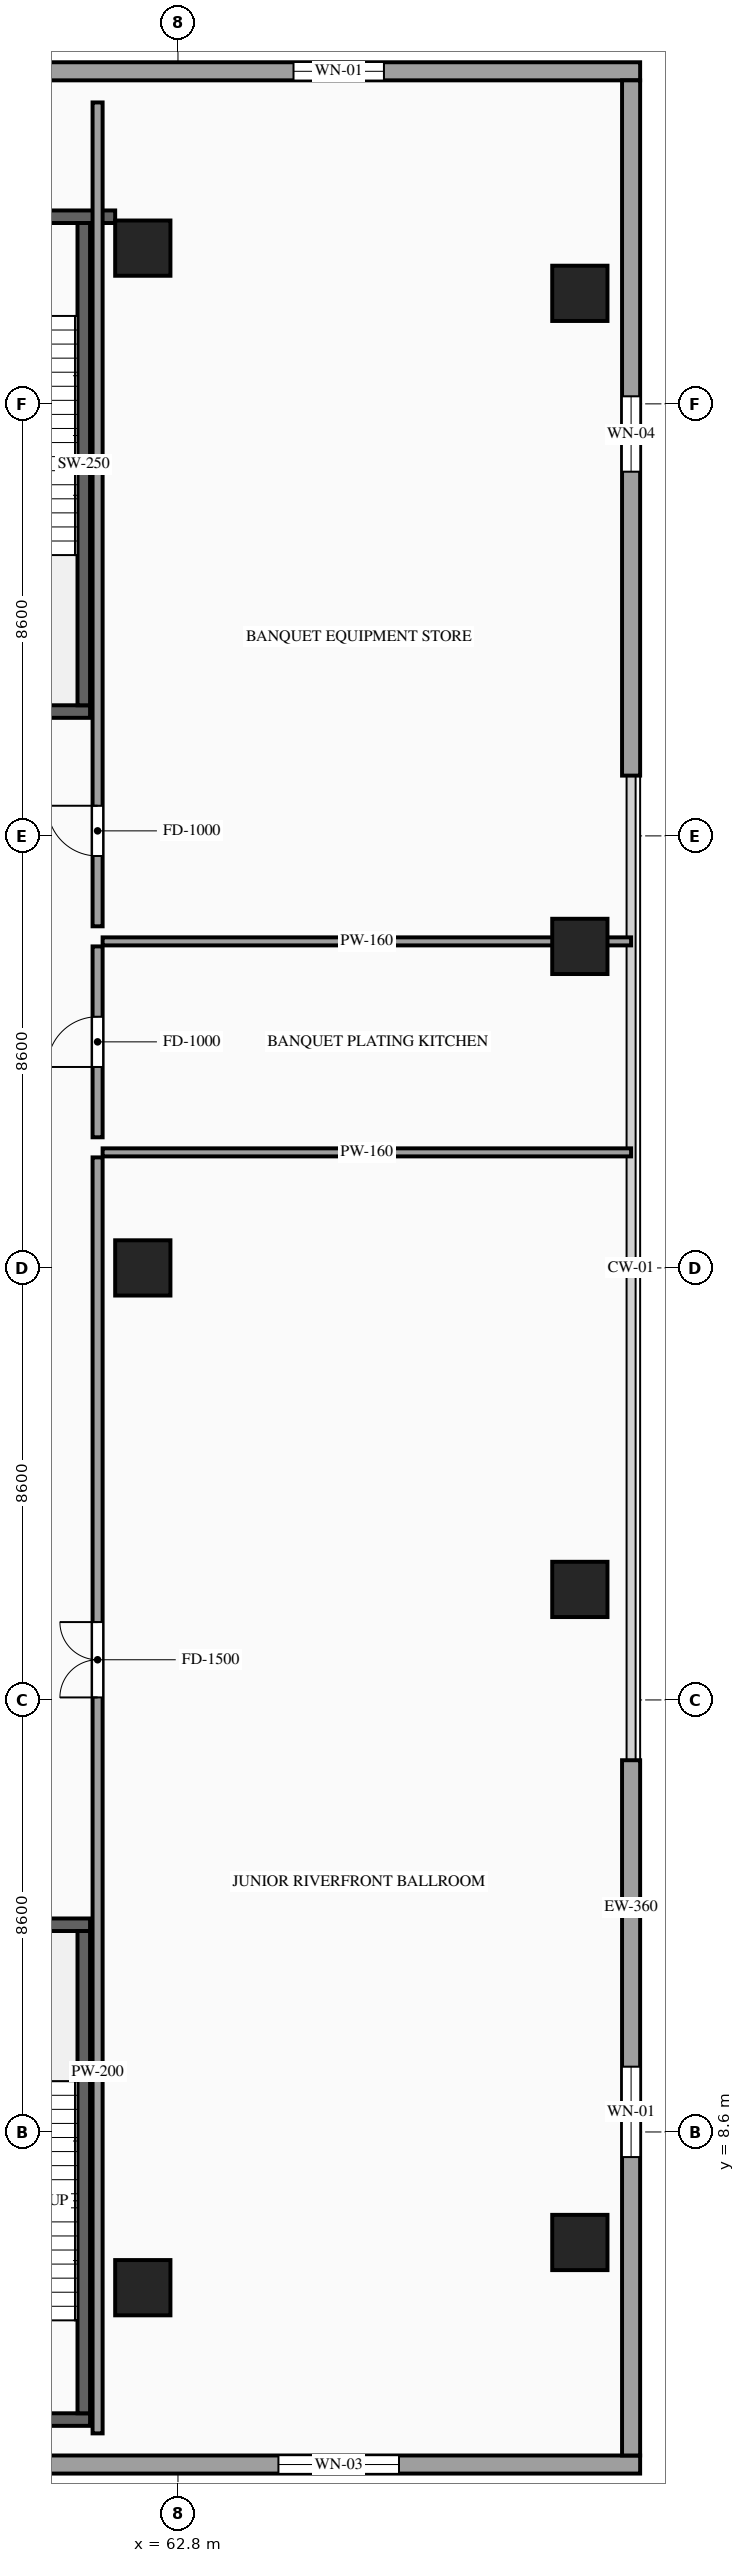
"""IFC4 building model, lengths in metres.
Left out: names, types, materials, properties, quantities, classifications, styles, units other than length and angle.
Written with IfcOpenShell. Run it as: python <this file> out.ifc"""

import sys

from ifc_helpers import new_model, si_unit, direction, frame, frame_2d, origin, origin_2d, place, context, subcontext, project, spatial, rectangle, extrude, source, transform, mapped, element, fill, save


model = new_model("IFC4")
c1 = context("Model", 3, precision=1e-05, world=origin(), true_north=direction((0.0, 1.0)))
c2 = subcontext(c1, "Body", "Model", "MODEL_VIEW")
j1 = project(units=[si_unit("LENGTHUNIT", "METRE"), si_unit("PLANEANGLEUNIT", "RADIAN")], contexts=[c1])
p1 = place(None, origin())
s1 = spatial("IfcSite", under=j1, at=p1, CompositionType="ELEMENT")
p2 = place(p1, origin())
s2 = spatial("IfcBuilding", under=s1, at=p2, CompositionType="ELEMENT")
p3 = place(p2, frame((0.0, 0.0, 19.8)))
s3 = spatial("IfcBuildingStorey", under=s2, at=p3, CompositionType="ELEMENT", Elevation=19.8)
m1 = source(origin(), c2, "Body", "SweptSolid", [
    extrude(rectangle(XDim=1.1, YDim=1.1, at=origin_2d()), origin(), (0.0, 0.0, 1.0), 6.0),
])
for number, where, z_axis, x_axis in (
    (1, (70.8, 6.4, 0.0), (0.0, 0.0, 1.0), (1.0, 0.0, 0.0)),
    (2, (70.8, 19.4, 0.0), (0.0, 0.0, 1.0), (1.0, 0.0, 0.0)),
    (3, (70.8, 32.2, 0.0), (0.0, 0.0, 1.0), (1.0, 0.0, 0.0)),
    (4, (70.8, 45.2, 0.0), (0.0, 0.0, 1.0), (1.0, 0.0, 0.0)),
    (5, (62.1, 5.5, 0.0), (0.0, 0.0, 1.0), (1.0, 0.0, 0.0)),
    (6, (62.1, 25.8, 0.0), (0.0, 0.0, 1.0), (1.0, 0.0, 0.0)),
    (7, (62.1, 46.1, 0.0), (0.0, 0.0, 1.0), (1.0, 0.0, 0.0)),
):
    element("IfcColumn", number, at=place(p3, frame(where, z_axis=z_axis, x_axis=x_axis)), inside=s3, PredefinedType="COLUMN", context=c2, shape_type="MappedRepresentation", body=[
        mapped(m1, transform((0.0, 0.0, 0.0), scale=1.0)),
    ])
p4 = place(p3, frame((59.07, 1.98, 0.0), z_axis=(0.0, 0.0, 1.0), x_axis=(1.0, 0.0, 0.0)))
e8 = element("IfcWall", 8, at=p4, inside=s3, PredefinedType="SOLIDWALL", context=c2, shape_type="SweptSolid", body=[
    extrude(rectangle(XDim=12.93, YDim=0.36, at=frame_2d((6.465, 0.0))), origin(), (0.0, 0.0, 1.0), 5.68),
])
p5 = place(p4, frame((5.73, 0.0, 0.85)))
e9 = element("IfcOpeningElement", 9, at=p5, cuts=e8, PredefinedType="OPENING", context=c2, shape_type="SweptSolid", body=[
    extrude(rectangle(XDim=2.4, YDim=2.4, at=frame_2d((1.2, 1.2))), frame((0.0, 0.195, 0.0), z_axis=(0.0, -1.0, 0.0), x_axis=(1.0, 0.0, 0.0)), (0.0, 0.0, 1.0), 0.39),
])
p6 = place(p3, frame((59.07, 49.62, 0.0), z_axis=(0.0, 0.0, 1.0), x_axis=(1.0, 0.0, 0.0)))
e10 = element("IfcWall", 10, at=p6, inside=s3, PredefinedType="SOLIDWALL", context=c2, shape_type="SweptSolid", body=[
    extrude(rectangle(XDim=12.93, YDim=0.36, at=frame_2d((6.465, 0.0))), origin(), (0.0, 0.0, 1.0), 5.68),
])
p7 = place(p6, frame((6.03, 0.0, 0.9)))
e11 = element("IfcOpeningElement", 11, at=p7, cuts=e10, PredefinedType="OPENING", context=c2, shape_type="SweptSolid", body=[
    extrude(rectangle(XDim=1.8, YDim=2.2, at=frame_2d((0.9, 1.1))), frame((0.0, 0.195, 0.0), z_axis=(0.0, -1.0, 0.0), x_axis=(1.0, 0.0, 0.0)), (0.0, 0.0, 1.0), 0.39),
])
p8 = place(p3, frame((71.82, 2.16, 0.0), z_axis=(0.0, 0.0, 1.0), x_axis=(0.0, 1.0, 0.0)))
e12 = element("IfcWall", 12, at=p8, inside=s3, PredefinedType="SOLIDWALL", context=c2, shape_type="SweptSolid", body=[
    extrude(rectangle(XDim=13.84, YDim=0.36, at=frame_2d((6.92, 0.0))), origin(), (0.0, 0.0, 1.0), 5.68),
])
p9 = place(p8, frame((5.94, 0.0, 0.9)))
e13 = element("IfcOpeningElement", 13, at=p9, cuts=e12, PredefinedType="OPENING", context=c2, shape_type="SweptSolid", body=[
    extrude(rectangle(XDim=1.8, YDim=2.2, at=frame_2d((0.9, 1.1))), frame((0.0, 0.195, 0.0), z_axis=(0.0, -1.0, 0.0), x_axis=(1.0, 0.0, 0.0)), (0.0, 0.0, 1.0), 0.39),
])
p10 = place(p3, frame((71.82, 35.6, 0.0), z_axis=(0.0, 0.0, 1.0), x_axis=(0.0, 1.0, 0.0)))
e14 = element("IfcWall", 14, at=p10, inside=s3, PredefinedType="SOLIDWALL", context=c2, shape_type="SweptSolid", body=[
    extrude(rectangle(XDim=13.84, YDim=0.36, at=frame_2d((6.92, 0.0))), origin(), (0.0, 0.0, 1.0), 5.68),
])
p11 = place(p10, frame((6.05, 0.0, 0.9)))
e15 = element("IfcOpeningElement", 15, at=p11, cuts=e14, PredefinedType="OPENING", context=c2, shape_type="SweptSolid", body=[
    extrude(rectangle(XDim=1.5, YDim=1.8, at=frame_2d((0.75, 0.9))), frame((0.0, 0.195, 0.0), z_axis=(0.0, -1.0, 0.0), x_axis=(1.0, 0.0, 0.0)), (0.0, 0.0, 1.0), 0.39),
])
m2 = source(origin(), c2, "Body", "SweptSolid", [
    extrude(rectangle(XDim=4.3, YDim=0.25, at=frame_2d((2.15, 0.0))), origin(), (0.0, 0.0, 1.0), 5.68),
])
for number, where, z_axis, x_axis in (
    (16, (56.75, 2.875, 0.0), (0.0, 0.0, 1.0), (1.0, 0.0, 0.0)),
    (17, (56.75, 12.725, 0.0), (0.0, 0.0, 1.0), (1.0, 0.0, 0.0)),
):
    element("IfcWall", number, at=place(p3, frame(where, z_axis=z_axis, x_axis=x_axis)), inside=s3, PredefinedType="SOLIDWALL", context=c2, shape_type="MappedRepresentation", body=[
        mapped(m2, transform((0.0, 0.0, 0.0), scale=1.0)),
    ])
m3 = source(origin(), c2, "Body", "SweptSolid", [
    extrude(rectangle(XDim=9.6, YDim=0.25, at=frame_2d((4.8, 0.0))), origin(), (0.0, 0.0, 1.0), 5.68),
])
p12 = place(p3, frame((60.925, 3.0, 0.0), z_axis=(0.0, 0.0, 1.0), x_axis=(0.0, 1.0, 0.0)))
e18 = element("IfcWall", 18, at=p12, inside=s3, PredefinedType="SOLIDWALL", context=c2, shape_type="MappedRepresentation", body=[
    mapped(m3, transform((0.0, 0.0, 0.0), scale=1.0)),
])
p13 = place(p3, frame((56.75, 36.875, 0.0), z_axis=(0.0, 0.0, 1.0), x_axis=(1.0, 0.0, 0.0)))
e19 = element("IfcWall", 19, at=p13, inside=s3, PredefinedType="SOLIDWALL", context=c2, shape_type="MappedRepresentation", body=[
    mapped(m2, transform((0.0, 0.0, 0.0), scale=1.0)),
])
m4 = source(origin(), c2, "Body", "SweptSolid", [
    extrude(rectangle(XDim=4.8, YDim=0.25, at=frame_2d((2.4, 0.0))), origin(), (0.0, 0.0, 1.0), 5.68),
])
p14 = place(p3, frame((56.75, 46.725, 0.0), z_axis=(0.0, 0.0, 1.0), x_axis=(1.0, 0.0, 0.0)))
e20 = element("IfcWall", 20, at=p14, inside=s3, PredefinedType="SOLIDWALL", context=c2, shape_type="MappedRepresentation", body=[
    mapped(m4, transform((0.0, 0.0, 0.0), scale=1.0)),
])
p15 = place(p3, frame((60.925, 37.0, 0.0), z_axis=(0.0, 0.0, 1.0), x_axis=(0.0, 1.0, 0.0)))
e21 = element("IfcWall", 21, at=p15, inside=s3, PredefinedType="SOLIDWALL", context=c2, shape_type="MappedRepresentation", body=[
    mapped(m3, transform((0.0, 0.0, 0.0), scale=1.0)),
])
p16 = place(p3, frame((61.2, 28.4, 0.0), z_axis=(0.0, 0.0, 1.0), x_axis=(0.0, 1.0, 0.0)))
e22 = element("IfcWall", 22, at=p16, inside=s3, PredefinedType="PARTITIONING", context=c2, shape_type="SweptSolid", body=[
    extrude(rectangle(XDim=3.8, YDim=0.2, at=frame_2d((1.9, 0.0))), origin(), (0.0, 0.0, 1.0), 5.68),
])
p17 = place(p16, frame((1.4, 0.0, 0.0)))
e23 = element("IfcOpeningElement", 23, at=p17, cuts=e22, PredefinedType="OPENING", context=c2, shape_type="SweptSolid", body=[
    extrude(rectangle(XDim=1.0, YDim=2.2, at=frame_2d((0.5, 1.1))), frame((0.0, 0.115, 0.0), z_axis=(0.0, -1.0, 0.0), x_axis=(1.0, 0.0, 0.0)), (0.0, 0.0, 1.0), 0.23),
])
m5 = source(origin(), c2, "Body", "SweptSolid", [
    extrude(rectangle(XDim=10.52, YDim=0.16, at=frame_2d((5.26, 0.0))), origin(), (0.0, 0.0, 1.0), 5.68),
])
p18 = place(p3, frame((61.3, 32.3, 0.0), z_axis=(0.0, 0.0, 1.0), x_axis=(1.0, 0.0, 0.0)))
e24 = element("IfcWall", 24, at=p18, inside=s3, PredefinedType="PARTITIONING", context=c2, shape_type="MappedRepresentation", body=[
    mapped(m5, transform((0.0, 0.0, 0.0), scale=1.0)),
])
p19 = place(p3, frame((61.2, 32.6, 0.0), z_axis=(0.0, 0.0, 1.0), x_axis=(0.0, 1.0, 0.0)))
e25 = element("IfcWall", 25, at=p19, inside=s3, PredefinedType="PARTITIONING", context=c2, shape_type="SweptSolid", body=[
    extrude(rectangle(XDim=16.4, YDim=0.2, at=frame_2d((8.2, 0.0))), origin(), (0.0, 0.0, 1.0), 5.68),
])
p20 = place(p19, frame((1.4, 0.0, 0.0)))
e26 = element("IfcOpeningElement", 26, at=p20, cuts=e25, PredefinedType="OPENING", context=c2, shape_type="SweptSolid", body=[
    extrude(rectangle(XDim=1.0, YDim=2.2, at=frame_2d((0.5, 1.1))), frame((0.0, 0.115, 0.0), z_axis=(0.0, -1.0, 0.0), x_axis=(1.0, 0.0, 0.0)), (0.0, 0.0, 1.0), 0.23),
])
p21 = place(p3, frame((61.2, 2.6, 0.0), z_axis=(0.0, 0.0, 1.0), x_axis=(0.0, 1.0, 0.0)))
e27 = element("IfcWall", 27, at=p21, inside=s3, PredefinedType="PARTITIONING", context=c2, shape_type="SweptSolid", body=[
    extrude(rectangle(XDim=25.4, YDim=0.2, at=frame_2d((12.7, 0.0))), origin(), (0.0, 0.0, 1.0), 5.68),
])
p22 = place(p21, frame((14.65, 0.0, 0.0)))
e28 = element("IfcOpeningElement", 28, at=p22, cuts=e27, PredefinedType="OPENING", context=c2, shape_type="SweptSolid", body=[
    extrude(rectangle(XDim=1.5, YDim=2.3, at=frame_2d((0.75, 1.15))), frame((0.0, 0.115, 0.0), z_axis=(0.0, -1.0, 0.0), x_axis=(1.0, 0.0, 0.0)), (0.0, 0.0, 1.0), 0.23),
])
p23 = place(p3, frame((61.3, 28.1, 0.0), z_axis=(0.0, 0.0, 1.0), x_axis=(1.0, 0.0, 0.0)))
e29 = element("IfcWall", 29, at=p23, inside=s3, PredefinedType="PARTITIONING", context=c2, shape_type="MappedRepresentation", body=[
    mapped(m5, transform((0.0, 0.0, 0.0), scale=1.0)),
])
m6 = source(origin(), c2, "Body", "SweptSolid", [
    extrude(rectangle(XDim=2.4, YDim=2.4, at=frame_2d((1.2, 1.2))), frame((0.0, 0.03, 0.0), z_axis=(0.0, -1.0, 0.0), x_axis=(1.0, 0.0, 0.0)), (0.0, 0.0, 1.0), 0.06),
])
p24 = place(p5, origin())
e30 = element("IfcWindow", 30, at=p24, inside=s3, PartitioningType="SINGLE_PANEL", PredefinedType="WINDOW", context=c2, shape_type="MappedRepresentation", body=[
    mapped(m6, transform((0.0, 0.0, 0.0), scale=1.0)),
])
fill(e9, e30)
m7 = source(origin(), c2, "Body", "SweptSolid", [
    extrude(rectangle(XDim=1.8, YDim=2.2, at=frame_2d((0.9, 1.1))), frame((0.0, 0.03, 0.0), z_axis=(0.0, -1.0, 0.0), x_axis=(1.0, 0.0, 0.0)), (0.0, 0.0, 1.0), 0.06),
])
p25 = place(p7, origin())
e31 = element("IfcWindow", 31, at=p25, inside=s3, PartitioningType="SINGLE_PANEL", PredefinedType="WINDOW", context=c2, shape_type="MappedRepresentation", body=[
    mapped(m7, transform((0.0, 0.0, 0.0), scale=1.0)),
])
fill(e11, e31)
p26 = place(p9, origin())
e32 = element("IfcWindow", 32, at=p26, inside=s3, PartitioningType="SINGLE_PANEL", PredefinedType="WINDOW", context=c2, shape_type="MappedRepresentation", body=[
    mapped(m7, transform((0.0, 0.0, 0.0), scale=1.0)),
])
fill(e13, e32)
m8 = source(origin(), c2, "Body", "SweptSolid", [
    extrude(rectangle(XDim=1.5, YDim=1.8, at=frame_2d((0.75, 0.9))), frame((0.0, 0.03, 0.0), z_axis=(0.0, -1.0, 0.0), x_axis=(1.0, 0.0, 0.0)), (0.0, 0.0, 1.0), 0.06),
])
p27 = place(p11, origin())
e33 = element("IfcWindow", 33, at=p27, inside=s3, PartitioningType="SINGLE_PANEL", PredefinedType="WINDOW", context=c2, shape_type="MappedRepresentation", body=[
    mapped(m8, transform((0.0, 0.0, 0.0), scale=1.0)),
])
fill(e15, e33)
m9 = source(origin(), c2, "Body", "SweptSolid", [
    extrude(rectangle(XDim=1.0, YDim=2.2, at=frame_2d((0.5, 1.1))), frame((0.0, 0.025, 0.0), z_axis=(0.0, -1.0, 0.0), x_axis=(1.0, 0.0, 0.0)), (0.0, 0.0, 1.0), 0.05),
])
p28 = place(p17, origin())
e34 = element("IfcDoor", 34, at=p28, inside=s3, OperationType="SINGLE_SWING_LEFT", PredefinedType="DOOR", context=c2, shape_type="MappedRepresentation", body=[
    mapped(m9, transform((0.0, 0.0, 0.0), scale=1.0)),
])
fill(e23, e34)
p29 = place(p20, origin())
e35 = element("IfcDoor", 35, at=p29, inside=s3, OperationType="SINGLE_SWING_RIGHT", PredefinedType="DOOR", context=c2, shape_type="MappedRepresentation", body=[
    mapped(m9, transform((0.0, 0.0, 0.0), scale=1.0)),
])
fill(e26, e35)
m10 = source(origin(), c2, "Body", "SweptSolid", [
    extrude(rectangle(XDim=1.5, YDim=2.3, at=frame_2d((0.75, 1.15))), frame((0.0, 0.025, 0.0), z_axis=(0.0, -1.0, 0.0), x_axis=(1.0, 0.0, 0.0)), (0.0, 0.0, 1.0), 0.05),
])
p30 = place(p22, origin())
e36 = element("IfcDoor", 36, at=p30, inside=s3, OperationType="DOUBLE_DOOR_SINGLE_SWING", PredefinedType="DOOR", context=c2, shape_type="MappedRepresentation", body=[
    mapped(m10, transform((0.0, 0.0, 0.0), scale=1.0)),
])
fill(e28, e36)
save(model, sys.argv[1])
